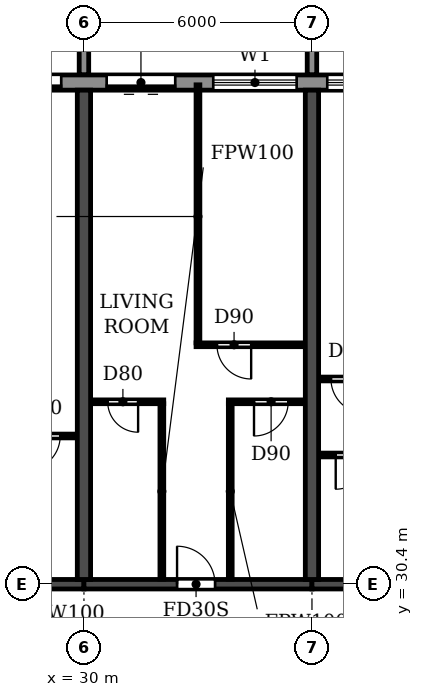
"""IFC4 building model, lengths in metres.
Left out: names, types, materials, properties, quantities, classifications, styles, units other than length and angle.
Written with IfcOpenShell. Run it as: python <this file> out.ifc"""

import sys

from ifc_helpers import new_model, si_unit, direction, frame, frame_2d, origin, place, context, subcontext, project, spatial, polyline, rectangle, outline, extrude, source, transform, mapped, element, fill, save


model = new_model("IFC4")
c1 = context("Model", 3, precision=1e-05, world=origin(), true_north=direction((0.0, 1.0)))
c2 = subcontext(c1, "Body", "Model", "MODEL_VIEW")
j1 = project(units=[si_unit("LENGTHUNIT", "METRE"), si_unit("PLANEANGLEUNIT", "RADIAN")], contexts=[c1])
p1 = place(None, origin())
s1 = spatial("IfcSite", under=j1, at=p1, CompositionType="ELEMENT")
p2 = place(p1, origin())
s2 = spatial("IfcBuilding", under=s1, at=p2, CompositionType="ELEMENT")
p3 = place(p2, frame((0.0, 0.0, 82.8)))
s3 = spatial("IfcBuildingStorey", under=s2, at=p3, CompositionType="ELEMENT", Elevation=82.8)
for number, where, z_axis, x_axis in (
    (1, (30.0, 30.525, 0.0), (0.0, 0.0, 1.0), (0.0, 1.0, 0.0)),
    (2, (36.0, 30.525, 0.0), (0.0, 0.0, 1.0), (0.0, 1.0, 0.0)),
):
    element("IfcWall", number, at=place(p3, frame(where, z_axis=z_axis, x_axis=x_axis)), inside=s3, PredefinedType="SHEAR", context=c2, shape_type="SweptSolid", body=[
        extrude(rectangle(XDim=12.875, YDim=0.35, at=frame_2d((6.438, 0.0))), origin(), (0.0, 0.0, 1.0), 3.06),
    ])
p4 = place(p3, frame((24.0, 30.4, 0.0), z_axis=(0.0, 0.0, 1.0), x_axis=(1.0, 0.0, 0.0)))
e3 = element("IfcWall", 3, at=p4, inside=s3, PredefinedType="SHEAR", context=c2, shape_type="SweptSolid", body=[
    extrude(rectangle(XDim=6.0, YDim=0.25, at=frame_2d((3.0, 0.0))), origin(), (0.0, 0.0, 1.0), 2.46),
])
p5 = place(p4, frame((2.45, 0.0, 0.0)))
e4 = element("IfcOpeningElement", 4, at=p5, cuts=e3, PredefinedType="OPENING", context=c2, shape_type="SweptSolid", body=[
    extrude(rectangle(XDim=1.0, YDim=2.1, at=frame_2d((0.5, 1.05))), frame((0.0, 0.135, 0.0), z_axis=(0.0, -1.0, 0.0), x_axis=(1.0, 0.0, 0.0)), (0.0, 0.0, 1.0), 0.27),
])
p6 = place(p3, frame((30.0, 30.4, 0.0), z_axis=(0.0, 0.0, 1.0), x_axis=(1.0, 0.0, 0.0)))
e5 = element("IfcWall", 5, at=p6, inside=s3, PredefinedType="SHEAR", context=c2, shape_type="SweptSolid", body=[
    extrude(rectangle(XDim=6.0, YDim=0.25, at=frame_2d((3.0, 0.0))), origin(), (0.0, 0.0, 1.0), 2.46),
])
p7 = place(p6, frame((2.45, 0.0, 0.0)))
e6 = element("IfcOpeningElement", 6, at=p7, cuts=e5, PredefinedType="OPENING", context=c2, shape_type="SweptSolid", body=[
    extrude(rectangle(XDim=1.0, YDim=2.1, at=frame_2d((0.5, 1.05))), frame((0.0, 0.135, 0.0), z_axis=(0.0, -1.0, 0.0), x_axis=(1.0, 0.0, 0.0)), (0.0, 0.0, 1.0), 0.27),
])
p8 = place(p3, frame((36.0, 30.4, 0.0), z_axis=(0.0, 0.0, 1.0), x_axis=(1.0, 0.0, 0.0)))
e7 = element("IfcWall", 7, at=p8, inside=s3, PredefinedType="SHEAR", context=c2, shape_type="SweptSolid", body=[
    extrude(rectangle(XDim=6.0, YDim=0.25, at=frame_2d((3.0, 0.0))), origin(), (0.0, 0.0, 1.0), 2.46),
])
p9 = place(p8, frame((2.55, 0.0, 0.0)))
e8 = element("IfcOpeningElement", 8, at=p9, cuts=e7, PredefinedType="OPENING", context=c2, shape_type="SweptSolid", body=[
    extrude(rectangle(XDim=1.0, YDim=2.1, at=frame_2d((0.5, 1.05))), frame((0.0, 0.135, 0.0), z_axis=(0.0, -1.0, 0.0), x_axis=(1.0, 0.0, 0.0)), (0.0, 0.0, 1.0), 0.27),
])
p10 = place(p3, frame((91.317, 43.6, 0.0), z_axis=(0.0, 0.0, 1.0), x_axis=(-1.0, 0.0, 0.0)))
e9 = element("IfcWall", 9, at=p10, inside=s3, PredefinedType="STANDARD", context=c2, shape_type="SweptSolid", body=[
    extrude(rectangle(XDim=80.634, YDim=0.4, at=frame_2d((40.317, 0.0))), origin(), (0.0, 0.0, 1.0), 3.06),
])
p11 = place(p10, frame((76.717, 0.0, 0.9)))
e10 = element("IfcOpeningElement", 10, at=p11, cuts=e9, PredefinedType="OPENING", context=c2, shape_type="SweptSolid", body=[
    extrude(rectangle(XDim=2.2, YDim=1.5, at=frame_2d((1.1, 0.75))), frame((0.0, 0.21, 0.0), z_axis=(0.0, -1.0, 0.0), x_axis=(1.0, 0.0, 0.0)), (0.0, 0.0, 1.0), 0.42),
])
p12 = place(p10, frame((73.917, 0.0, 0.0)))
e11 = element("IfcOpeningElement", 11, at=p12, cuts=e9, PredefinedType="OPENING", context=c2, shape_type="SweptSolid", body=[
    extrude(rectangle(XDim=1.8, YDim=2.4, at=frame_2d((0.9, 1.2))), frame((0.0, 0.21, 0.0), z_axis=(0.0, -1.0, 0.0), x_axis=(1.0, 0.0, 0.0)), (0.0, 0.0, 1.0), 0.42),
])
p13 = place(p10, frame((70.717, 0.0, 0.9)))
e12 = element("IfcOpeningElement", 12, at=p13, cuts=e9, PredefinedType="OPENING", context=c2, shape_type="SweptSolid", body=[
    extrude(rectangle(XDim=2.2, YDim=1.5, at=frame_2d((1.1, 0.75))), frame((0.0, 0.21, 0.0), z_axis=(0.0, -1.0, 0.0), x_axis=(1.0, 0.0, 0.0)), (0.0, 0.0, 1.0), 0.42),
])
p14 = place(p10, frame((67.717, 0.0, 0.9)))
e13 = element("IfcOpeningElement", 13, at=p14, cuts=e9, PredefinedType="OPENING", context=c2, shape_type="SweptSolid", body=[
    extrude(rectangle(XDim=2.2, YDim=1.5, at=frame_2d((1.1, 0.75))), frame((0.0, 0.21, 0.0), z_axis=(0.0, -1.0, 0.0), x_axis=(1.0, 0.0, 0.0)), (0.0, 0.0, 1.0), 0.42),
])
p15 = place(p10, frame((64.717, 0.0, 0.9)))
e14 = element("IfcOpeningElement", 14, at=p15, cuts=e9, PredefinedType="OPENING", context=c2, shape_type="SweptSolid", body=[
    extrude(rectangle(XDim=2.2, YDim=1.5, at=frame_2d((1.1, 0.75))), frame((0.0, 0.21, 0.0), z_axis=(0.0, -1.0, 0.0), x_axis=(1.0, 0.0, 0.0)), (0.0, 0.0, 1.0), 0.42),
])
p16 = place(p10, frame((61.917, 0.0, 0.0)))
e15 = element("IfcOpeningElement", 15, at=p16, cuts=e9, PredefinedType="OPENING", context=c2, shape_type="SweptSolid", body=[
    extrude(rectangle(XDim=1.8, YDim=2.4, at=frame_2d((0.9, 1.2))), frame((0.0, 0.21, 0.0), z_axis=(0.0, -1.0, 0.0), x_axis=(1.0, 0.0, 0.0)), (0.0, 0.0, 1.0), 0.42),
])
p17 = place(p10, frame((58.917, 0.0, 0.0)))
e16 = element("IfcOpeningElement", 16, at=p17, cuts=e9, PredefinedType="OPENING", context=c2, shape_type="SweptSolid", body=[
    extrude(rectangle(XDim=1.8, YDim=2.4, at=frame_2d((0.9, 1.2))), frame((0.0, 0.21, 0.0), z_axis=(0.0, -1.0, 0.0), x_axis=(1.0, 0.0, 0.0)), (0.0, 0.0, 1.0), 0.42),
])
p18 = place(p10, frame((55.717, 0.0, 0.9)))
e17 = element("IfcOpeningElement", 17, at=p18, cuts=e9, PredefinedType="OPENING", context=c2, shape_type="SweptSolid", body=[
    extrude(rectangle(XDim=2.2, YDim=1.5, at=frame_2d((1.1, 0.75))), frame((0.0, 0.21, 0.0), z_axis=(0.0, -1.0, 0.0), x_axis=(1.0, 0.0, 0.0)), (0.0, 0.0, 1.0), 0.42),
])
p19 = place(p10, frame((52.717, 0.0, 0.9)))
e18 = element("IfcOpeningElement", 18, at=p19, cuts=e9, PredefinedType="OPENING", context=c2, shape_type="SweptSolid", body=[
    extrude(rectangle(XDim=2.2, YDim=1.5, at=frame_2d((1.1, 0.75))), frame((0.0, 0.21, 0.0), z_axis=(0.0, -1.0, 0.0), x_axis=(1.0, 0.0, 0.0)), (0.0, 0.0, 1.0), 0.42),
])
p20 = place(p10, frame((49.917, 0.0, 0.0)))
e19 = element("IfcOpeningElement", 19, at=p20, cuts=e9, PredefinedType="OPENING", context=c2, shape_type="SweptSolid", body=[
    extrude(rectangle(XDim=1.8, YDim=2.4, at=frame_2d((0.9, 1.2))), frame((0.0, 0.21, 0.0), z_axis=(0.0, -1.0, 0.0), x_axis=(1.0, 0.0, 0.0)), (0.0, 0.0, 1.0), 0.42),
])
p21 = place(p10, frame((46.717, 0.0, 0.9)))
e20 = element("IfcOpeningElement", 20, at=p21, cuts=e9, PredefinedType="OPENING", context=c2, shape_type="SweptSolid", body=[
    extrude(rectangle(XDim=2.2, YDim=1.5, at=frame_2d((1.1, 0.75))), frame((0.0, 0.21, 0.0), z_axis=(0.0, -1.0, 0.0), x_axis=(1.0, 0.0, 0.0)), (0.0, 0.0, 1.0), 0.42),
])
p22 = place(p10, frame((43.717, 0.0, 0.9)))
e21 = element("IfcOpeningElement", 21, at=p22, cuts=e9, PredefinedType="OPENING", context=c2, shape_type="SweptSolid", body=[
    extrude(rectangle(XDim=2.2, YDim=1.5, at=frame_2d((1.1, 0.75))), frame((0.0, 0.21, 0.0), z_axis=(0.0, -1.0, 0.0), x_axis=(1.0, 0.0, 0.0)), (0.0, 0.0, 1.0), 0.42),
])
p23 = place(p10, frame((40.717, 0.0, 0.9)))
e22 = element("IfcOpeningElement", 22, at=p23, cuts=e9, PredefinedType="OPENING", context=c2, shape_type="SweptSolid", body=[
    extrude(rectangle(XDim=2.2, YDim=1.5, at=frame_2d((1.1, 0.75))), frame((0.0, 0.21, 0.0), z_axis=(0.0, -1.0, 0.0), x_axis=(1.0, 0.0, 0.0)), (0.0, 0.0, 1.0), 0.42),
])
p24 = place(p10, frame((37.917, 0.0, 0.0)))
e23 = element("IfcOpeningElement", 23, at=p24, cuts=e9, PredefinedType="OPENING", context=c2, shape_type="SweptSolid", body=[
    extrude(rectangle(XDim=1.8, YDim=2.4, at=frame_2d((0.9, 1.2))), frame((0.0, 0.21, 0.0), z_axis=(0.0, -1.0, 0.0), x_axis=(1.0, 0.0, 0.0)), (0.0, 0.0, 1.0), 0.42),
])
p25 = place(p10, frame((34.717, 0.0, 0.9)))
e24 = element("IfcOpeningElement", 24, at=p25, cuts=e9, PredefinedType="OPENING", context=c2, shape_type="SweptSolid", body=[
    extrude(rectangle(XDim=2.2, YDim=1.5, at=frame_2d((1.1, 0.75))), frame((0.0, 0.21, 0.0), z_axis=(0.0, -1.0, 0.0), x_axis=(1.0, 0.0, 0.0)), (0.0, 0.0, 1.0), 0.42),
])
p26 = place(p10, frame((31.717, 0.0, 0.9)))
e25 = element("IfcOpeningElement", 25, at=p26, cuts=e9, PredefinedType="OPENING", context=c2, shape_type="SweptSolid", body=[
    extrude(rectangle(XDim=2.2, YDim=1.5, at=frame_2d((1.1, 0.75))), frame((0.0, 0.21, 0.0), z_axis=(0.0, -1.0, 0.0), x_axis=(1.0, 0.0, 0.0)), (0.0, 0.0, 1.0), 0.42),
])
p27 = place(p10, frame((28.917, 0.0, 0.0)))
e26 = element("IfcOpeningElement", 26, at=p27, cuts=e9, PredefinedType="OPENING", context=c2, shape_type="SweptSolid", body=[
    extrude(rectangle(XDim=1.8, YDim=2.4, at=frame_2d((0.9, 1.2))), frame((0.0, 0.21, 0.0), z_axis=(0.0, -1.0, 0.0), x_axis=(1.0, 0.0, 0.0)), (0.0, 0.0, 1.0), 0.42),
])
p28 = place(p10, frame((25.717, 0.0, 0.9)))
e27 = element("IfcOpeningElement", 27, at=p28, cuts=e9, PredefinedType="OPENING", context=c2, shape_type="SweptSolid", body=[
    extrude(rectangle(XDim=2.2, YDim=1.5, at=frame_2d((1.1, 0.75))), frame((0.0, 0.21, 0.0), z_axis=(0.0, -1.0, 0.0), x_axis=(1.0, 0.0, 0.0)), (0.0, 0.0, 1.0), 0.42),
])
p29 = place(p10, frame((22.717, 0.0, 0.9)))
e28 = element("IfcOpeningElement", 28, at=p29, cuts=e9, PredefinedType="OPENING", context=c2, shape_type="SweptSolid", body=[
    extrude(rectangle(XDim=2.2, YDim=1.5, at=frame_2d((1.1, 0.75))), frame((0.0, 0.21, 0.0), z_axis=(0.0, -1.0, 0.0), x_axis=(1.0, 0.0, 0.0)), (0.0, 0.0, 1.0), 0.42),
])
p30 = place(p10, frame((19.717, 0.0, 0.9)))
e29 = element("IfcOpeningElement", 29, at=p30, cuts=e9, PredefinedType="OPENING", context=c2, shape_type="SweptSolid", body=[
    extrude(rectangle(XDim=2.2, YDim=1.5, at=frame_2d((1.1, 0.75))), frame((0.0, 0.21, 0.0), z_axis=(0.0, -1.0, 0.0), x_axis=(1.0, 0.0, 0.0)), (0.0, 0.0, 1.0), 0.42),
])
p31 = place(p10, frame((16.717, 0.0, 0.9)))
e30 = element("IfcOpeningElement", 30, at=p31, cuts=e9, PredefinedType="OPENING", context=c2, shape_type="SweptSolid", body=[
    extrude(rectangle(XDim=2.2, YDim=1.5, at=frame_2d((1.1, 0.75))), frame((0.0, 0.21, 0.0), z_axis=(0.0, -1.0, 0.0), x_axis=(1.0, 0.0, 0.0)), (0.0, 0.0, 1.0), 0.42),
])
p32 = place(p10, frame((13.917, 0.0, 0.0)))
e31 = element("IfcOpeningElement", 31, at=p32, cuts=e9, PredefinedType="OPENING", context=c2, shape_type="SweptSolid", body=[
    extrude(rectangle(XDim=1.8, YDim=2.4, at=frame_2d((0.9, 1.2))), frame((0.0, 0.21, 0.0), z_axis=(0.0, -1.0, 0.0), x_axis=(1.0, 0.0, 0.0)), (0.0, 0.0, 1.0), 0.42),
])
p33 = place(p10, frame((10.717, 0.0, 0.9)))
e32 = element("IfcOpeningElement", 32, at=p33, cuts=e9, PredefinedType="OPENING", context=c2, shape_type="SweptSolid", body=[
    extrude(rectangle(XDim=2.2, YDim=1.5, at=frame_2d((1.1, 0.75))), frame((0.0, 0.21, 0.0), z_axis=(0.0, -1.0, 0.0), x_axis=(1.0, 0.0, 0.0)), (0.0, 0.0, 1.0), 0.42),
])
p34 = place(p10, frame((7.717, 0.0, 0.9)))
e33 = element("IfcOpeningElement", 33, at=p34, cuts=e9, PredefinedType="OPENING", context=c2, shape_type="SweptSolid", body=[
    extrude(rectangle(XDim=2.2, YDim=1.5, at=frame_2d((1.1, 0.75))), frame((0.0, 0.21, 0.0), z_axis=(0.0, -1.0, 0.0), x_axis=(1.0, 0.0, 0.0)), (0.0, 0.0, 1.0), 0.42),
])
p35 = place(p10, frame((4.917, 0.0, 0.0)))
e34 = element("IfcOpeningElement", 34, at=p35, cuts=e9, PredefinedType="OPENING", context=c2, shape_type="SweptSolid", body=[
    extrude(rectangle(XDim=1.8, YDim=2.4, at=frame_2d((0.9, 1.2))), frame((0.0, 0.21, 0.0), z_axis=(0.0, -1.0, 0.0), x_axis=(1.0, 0.0, 0.0)), (0.0, 0.0, 1.0), 0.42),
])
p36 = place(p10, frame((1.717, 0.0, 0.9)))
e35 = element("IfcOpeningElement", 35, at=p36, cuts=e9, PredefinedType="OPENING", context=c2, shape_type="SweptSolid", body=[
    extrude(rectangle(XDim=2.2, YDim=1.5, at=frame_2d((1.1, 0.75))), frame((0.0, 0.21, 0.0), z_axis=(0.0, -1.0, 0.0), x_axis=(1.0, 0.0, 0.0)), (0.0, 0.0, 1.0), 0.42),
])
m1 = source(origin(), c2, "Body", "SweptSolid", [
    extrude(outline(polyline([(0.0, 0.0), (0.25, 0.0), (0.25, 3.1), (0.0, 3.1), (0.0, 0.0)])), origin(), (0.0, 0.0, 1.0), 3.1),
])
for number, where in (
    (36, (29.875, 43.8, 0.0)),
    (37, (35.875, 43.8, 0.0)),
):
    element("IfcWall", number, at=place(p3, frame(where)), inside=s3, PredefinedType="STANDARD", context=c2, shape_type="MappedRepresentation", body=[
        mapped(m1, transform((0.0, 0.0, 0.0))),
    ])
p37 = place(p3, frame((36.185, 33.8, 0.0), z_axis=(0.0, 0.0, 1.0), x_axis=(1.0, 0.0, 0.0)))
e38 = element("IfcWall", 38, at=p37, inside=s3, PredefinedType="PARTITIONING", context=c2, shape_type="SweptSolid", body=[
    extrude(rectangle(XDim=2.015, YDim=0.1, at=frame_2d((1.007, 0.0))), origin(), (0.0, 0.0, 1.0), 3.06),
])
p38 = place(p37, frame((0.44, 0.0, 0.0)))
e39 = element("IfcOpeningElement", 39, at=p38, cuts=e38, PredefinedType="OPENING", context=c2, shape_type="SweptSolid", body=[
    extrude(rectangle(XDim=0.9, YDim=2.1, at=frame_2d((0.45, 1.05))), frame((0.0, 0.06, 0.0), z_axis=(0.0, -1.0, 0.0), x_axis=(1.0, 0.0, 0.0)), (0.0, 0.0, 1.0), 0.12),
])
p39 = place(p3, frame((27.8, 34.3, 0.0), z_axis=(0.0, 0.0, 1.0), x_axis=(1.0, 0.0, 0.0)))
e40 = element("IfcWall", 40, at=p39, inside=s3, PredefinedType="PARTITIONING", context=c2, shape_type="SweptSolid", body=[
    extrude(rectangle(XDim=2.015, YDim=0.1, at=frame_2d((1.007, 0.0))), origin(), (0.0, 0.0, 1.0), 3.06),
])
p40 = place(p39, frame((0.675, 0.0, 0.0)))
e41 = element("IfcOpeningElement", 41, at=p40, cuts=e40, PredefinedType="OPENING", context=c2, shape_type="SweptSolid", body=[
    extrude(rectangle(XDim=0.9, YDim=2.1, at=frame_2d((0.45, 1.05))), frame((0.0, 0.06, 0.0), z_axis=(0.0, -1.0, 0.0), x_axis=(1.0, 0.0, 0.0)), (0.0, 0.0, 1.0), 0.12),
])
p41 = place(p3, frame((30.185, 35.2, 0.0), z_axis=(0.0, 0.0, 1.0), x_axis=(1.0, 0.0, 0.0)))
e42 = element("IfcWall", 42, at=p41, inside=s3, PredefinedType="PARTITIONING", context=c2, shape_type="SweptSolid", body=[
    extrude(rectangle(XDim=1.915, YDim=0.1, at=frame_2d((0.958, 0.0))), origin(), (0.0, 0.0, 1.0), 3.06),
])
p42 = place(p41, frame((0.44, 0.0, 0.0)))
e43 = element("IfcOpeningElement", 43, at=p42, cuts=e42, PredefinedType="OPENING", context=c2, shape_type="SweptSolid", body=[
    extrude(rectangle(XDim=0.8, YDim=2.1, at=frame_2d((0.4, 1.05))), frame((0.0, 0.06, 0.0), z_axis=(0.0, -1.0, 0.0), x_axis=(1.0, 0.0, 0.0)), (0.0, 0.0, 1.0), 0.12),
])
p43 = place(p3, frame((33.8, 35.2, 0.0), z_axis=(0.0, 0.0, 1.0), x_axis=(1.0, 0.0, 0.0)))
e44 = element("IfcWall", 44, at=p43, inside=s3, PredefinedType="PARTITIONING", context=c2, shape_type="SweptSolid", body=[
    extrude(rectangle(XDim=2.015, YDim=0.1, at=frame_2d((1.007, 0.0))), origin(), (0.0, 0.0, 1.0), 3.06),
])
p44 = place(p43, frame((0.675, 0.0, 0.0)))
e45 = element("IfcOpeningElement", 45, at=p44, cuts=e44, PredefinedType="OPENING", context=c2, shape_type="SweptSolid", body=[
    extrude(rectangle(XDim=0.9, YDim=2.1, at=frame_2d((0.45, 1.05))), frame((0.0, 0.06, 0.0), z_axis=(0.0, -1.0, 0.0), x_axis=(1.0, 0.0, 0.0)), (0.0, 0.0, 1.0), 0.12),
])
p45 = place(p3, frame((36.185, 35.8, 0.0), z_axis=(0.0, 0.0, 1.0), x_axis=(1.0, 0.0, 0.0)))
e46 = element("IfcWall", 46, at=p45, inside=s3, PredefinedType="PARTITIONING", context=c2, shape_type="SweptSolid", body=[
    extrude(rectangle(XDim=2.865, YDim=0.1, at=frame_2d((1.433, 0.0))), origin(), (0.0, 0.0, 1.0), 3.06),
])
p46 = place(p45, frame((0.315, 0.0, 0.0)))
e47 = element("IfcOpeningElement", 47, at=p46, cuts=e46, PredefinedType="OPENING", context=c2, shape_type="SweptSolid", body=[
    extrude(rectangle(XDim=0.9, YDim=2.1, at=frame_2d((0.45, 1.05))), frame((0.0, 0.06, 0.0), z_axis=(0.0, -1.0, 0.0), x_axis=(1.0, 0.0, 0.0)), (0.0, 0.0, 1.0), 0.12),
])
p47 = place(p3, frame((32.95, 36.7, 0.0), z_axis=(0.0, 0.0, 1.0), x_axis=(1.0, 0.0, 0.0)))
e48 = element("IfcWall", 48, at=p47, inside=s3, PredefinedType="PARTITIONING", context=c2, shape_type="SweptSolid", body=[
    extrude(rectangle(XDim=2.865, YDim=0.1, at=frame_2d((1.433, 0.0))), origin(), (0.0, 0.0, 1.0), 3.06),
])
p48 = place(p47, frame((0.55, 0.0, 0.0)))
e49 = element("IfcOpeningElement", 49, at=p48, cuts=e48, PredefinedType="OPENING", context=c2, shape_type="SweptSolid", body=[
    extrude(rectangle(XDim=0.9, YDim=2.1, at=frame_2d((0.45, 1.05))), frame((0.0, 0.06, 0.0), z_axis=(0.0, -1.0, 0.0), x_axis=(1.0, 0.0, 0.0)), (0.0, 0.0, 1.0), 0.12),
])
p49 = place(p3, frame((32.05, 30.535, 0.0), z_axis=(0.0, 0.0, 1.0), x_axis=(0.0, 1.0, 0.0)))
e50 = element("IfcWall", 50, at=p49, inside=s3, PredefinedType="PARTITIONING", context=c2, shape_type="SweptSolid", body=[
    extrude(rectangle(XDim=4.615, YDim=0.1, at=frame_2d((2.308, 0.0))), origin(), (0.0, 0.0, 1.0), 3.06),
])
p50 = place(p3, frame((33.0, 36.75, 0.0), z_axis=(0.0, 0.0, 1.0), x_axis=(0.0, 1.0, 0.0)))
e51 = element("IfcWall", 51, at=p50, inside=s3, PredefinedType="PARTITIONING", context=c2, shape_type="SweptSolid", body=[
    extrude(rectangle(XDim=6.79, YDim=0.1, at=frame_2d((3.395, 0.0))), origin(), (0.0, 0.0, 1.0), 3.06),
])
p51 = place(p3, frame((33.85, 30.535, 0.0), z_axis=(0.0, 0.0, 1.0), x_axis=(0.0, 1.0, 0.0)))
e52 = element("IfcWall", 52, at=p51, inside=s3, PredefinedType="PARTITIONING", context=c2, shape_type="SweptSolid", body=[
    extrude(rectangle(XDim=4.615, YDim=0.1, at=frame_2d((2.308, 0.0))), origin(), (0.0, 0.0, 1.0), 3.06),
])
p52 = place(p16, origin())
e53 = element("IfcDoor", 53, at=p52, inside=s3, OperationType="DOUBLE_DOOR_SLIDING", PredefinedType="DOOR", context=c2, shape_type="SweptSolid", body=[
    extrude(rectangle(XDim=1.8, YDim=2.4, at=frame_2d((0.9, 1.2))), frame((0.0, 0.025, 0.0), z_axis=(0.0, -1.0, 0.0), x_axis=(1.0, 0.0, 0.0)), (0.0, 0.0, 1.0), 0.05),
])
fill(e15, e53)
p53 = place(p17, origin())
e54 = element("IfcDoor", 54, at=p53, inside=s3, OperationType="DOUBLE_DOOR_SLIDING", PredefinedType="DOOR", context=c2, shape_type="SweptSolid", body=[
    extrude(rectangle(XDim=1.8, YDim=2.4, at=frame_2d((0.9, 1.2))), frame((0.0, 0.025, 0.0), z_axis=(0.0, -1.0, 0.0), x_axis=(1.0, 0.0, 0.0)), (0.0, 0.0, 1.0), 0.05),
])
fill(e16, e54)
p54 = place(p18, origin())
e55 = element("IfcWindow", 55, at=p54, inside=s3, PartitioningType="DOUBLE_PANEL_HORIZONTAL", PredefinedType="WINDOW", context=c2, shape_type="SweptSolid", body=[
    extrude(rectangle(XDim=2.2, YDim=1.5, at=frame_2d((1.1, 0.75))), frame((0.0, 0.03, 0.0), z_axis=(0.0, -1.0, 0.0), x_axis=(1.0, 0.0, 0.0)), (0.0, 0.0, 1.0), 0.06),
])
fill(e17, e55)
p55 = place(p19, origin())
e56 = element("IfcWindow", 56, at=p55, inside=s3, PartitioningType="DOUBLE_PANEL_HORIZONTAL", PredefinedType="WINDOW", context=c2, shape_type="SweptSolid", body=[
    extrude(rectangle(XDim=2.2, YDim=1.5, at=frame_2d((1.1, 0.75))), frame((0.0, 0.03, 0.0), z_axis=(0.0, -1.0, 0.0), x_axis=(1.0, 0.0, 0.0)), (0.0, 0.0, 1.0), 0.06),
])
fill(e18, e56)
p56 = place(p40, frame((0.9, 0.0, 0.0), z_axis=(0.0, 0.0, 1.0), x_axis=(-1.0, 0.0, 0.0)))
e57 = element("IfcDoor", 57, at=p56, inside=s3, OperationType="SINGLE_SWING_RIGHT", PredefinedType="DOOR", context=c2, shape_type="SweptSolid", body=[
    extrude(rectangle(XDim=0.9, YDim=2.1, at=frame_2d((0.45, 1.05))), frame((0.0, 0.025, 0.0), z_axis=(0.0, -1.0, 0.0), x_axis=(1.0, 0.0, 0.0)), (0.0, 0.0, 1.0), 0.05),
])
fill(e41, e57)
p57 = place(p42, frame((0.8, 0.0, 0.0), z_axis=(0.0, 0.0, 1.0), x_axis=(-1.0, 0.0, 0.0)))
e58 = element("IfcDoor", 58, at=p57, inside=s3, OperationType="SINGLE_SWING_LEFT", PredefinedType="DOOR", context=c2, shape_type="SweptSolid", body=[
    extrude(rectangle(XDim=0.8, YDim=2.1, at=frame_2d((0.4, 1.05))), frame((0.0, 0.025, 0.0), z_axis=(0.0, -1.0, 0.0), x_axis=(1.0, 0.0, 0.0)), (0.0, 0.0, 1.0), 0.05),
])
fill(e43, e58)
p58 = place(p7, origin())
e59 = element("IfcDoor", 59, at=p58, inside=s3, OperationType="SINGLE_SWING_LEFT", PredefinedType="DOOR", context=c2, shape_type="SweptSolid", body=[
    extrude(rectangle(XDim=1.0, YDim=2.1, at=frame_2d((0.5, 1.05))), frame((0.0, 0.025, 0.0), z_axis=(0.0, -1.0, 0.0), x_axis=(1.0, 0.0, 0.0)), (0.0, 0.0, 1.0), 0.05),
])
fill(e6, e59)
p59 = place(p48, frame((0.9, 0.0, 0.0), z_axis=(0.0, 0.0, 1.0), x_axis=(-1.0, 0.0, 0.0)))
e60 = element("IfcDoor", 60, at=p59, inside=s3, OperationType="SINGLE_SWING_LEFT", PredefinedType="DOOR", context=c2, shape_type="SweptSolid", body=[
    extrude(rectangle(XDim=0.9, YDim=2.1, at=frame_2d((0.45, 1.05))), frame((0.0, 0.025, 0.0), z_axis=(0.0, -1.0, 0.0), x_axis=(1.0, 0.0, 0.0)), (0.0, 0.0, 1.0), 0.05),
])
fill(e49, e60)
p60 = place(p44, frame((0.9, 0.0, 0.0), z_axis=(0.0, 0.0, 1.0), x_axis=(-1.0, 0.0, 0.0)))
e61 = element("IfcDoor", 61, at=p60, inside=s3, OperationType="SINGLE_SWING_RIGHT", PredefinedType="DOOR", context=c2, shape_type="SweptSolid", body=[
    extrude(rectangle(XDim=0.9, YDim=2.1, at=frame_2d((0.45, 1.05))), frame((0.0, 0.025, 0.0), z_axis=(0.0, -1.0, 0.0), x_axis=(1.0, 0.0, 0.0)), (0.0, 0.0, 1.0), 0.05),
])
fill(e45, e61)
p61 = place(p46, frame((0.9, 0.0, 0.0), z_axis=(0.0, 0.0, 1.0), x_axis=(-1.0, 0.0, 0.0)))
e62 = element("IfcDoor", 62, at=p61, inside=s3, OperationType="SINGLE_SWING_LEFT", PredefinedType="DOOR", context=c2, shape_type="SweptSolid", body=[
    extrude(rectangle(XDim=0.9, YDim=2.1, at=frame_2d((0.45, 1.05))), frame((0.0, 0.025, 0.0), z_axis=(0.0, -1.0, 0.0), x_axis=(1.0, 0.0, 0.0)), (0.0, 0.0, 1.0), 0.05),
])
fill(e47, e62)
p62 = place(p38, frame((0.9, 0.0, 0.0), z_axis=(0.0, 0.0, 1.0), x_axis=(-1.0, 0.0, 0.0)))
e63 = element("IfcDoor", 63, at=p62, inside=s3, OperationType="SINGLE_SWING_RIGHT", PredefinedType="DOOR", context=c2, shape_type="SweptSolid", body=[
    extrude(rectangle(XDim=0.9, YDim=2.1, at=frame_2d((0.45, 1.05))), frame((0.0, 0.025, 0.0), z_axis=(0.0, -1.0, 0.0), x_axis=(1.0, 0.0, 0.0)), (0.0, 0.0, 1.0), 0.05),
])
fill(e39, e63)
save(model, sys.argv[1])
